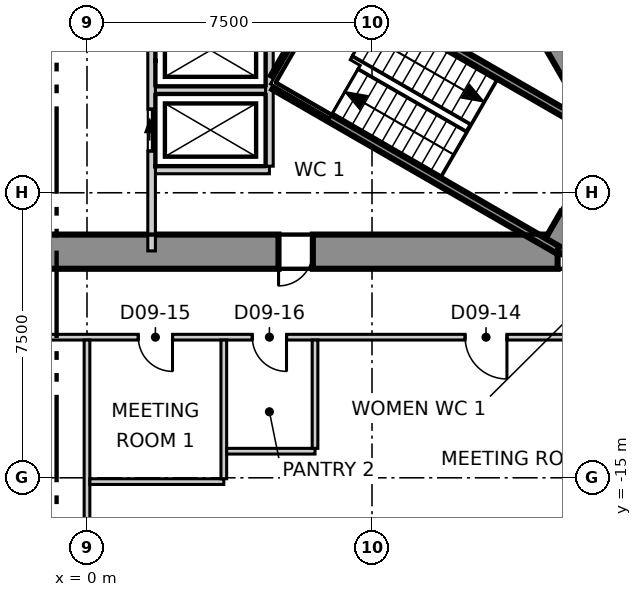
"""IFC4 building model, lengths in metres.
Left out: names, types, materials, properties, quantities, classifications, styles, units other than length and angle.
Written with IfcOpenShell. Run it as: python <this file> out.ifc"""

import sys

from ifc_helpers import new_model, si_unit, direction, frame, frame_2d, origin, place, context, subcontext, project, spatial, polyline, rectangle, outline, extrude, element, fill, save


model = new_model("IFC4")
c1 = context("Model", 3, precision=1e-05, world=origin(), true_north=direction((0.0, 1.0)))
c2 = subcontext(c1, "Body", "Model", "MODEL_VIEW")
j1 = project(units=[si_unit("LENGTHUNIT", "METRE"), si_unit("PLANEANGLEUNIT", "RADIAN")], contexts=[c1])
p1 = place(None, origin())
s1 = spatial("IfcSite", under=j1, at=p1, CompositionType="ELEMENT")
p2 = place(p1, origin())
s2 = spatial("IfcBuilding", under=s1, at=p2, CompositionType="ELEMENT")
p3 = place(p2, frame((0.0, 0.0, 47.3)))
s3 = spatial("IfcBuildingStorey", under=s2, at=p3, CompositionType="ELEMENT", Elevation=47.3)
p4 = place(p3, frame((-12.384, -9.05, -0.3), z_axis=(0.0, 0.0, 1.0), x_axis=(1.0, 0.0, 0.0)))
e1 = element("IfcWall", 1, at=p4, inside=s3, PredefinedType="SHEAR", context=c2, shape_type="SweptSolid", body=[
    extrude(outline(polyline([(-0.26, -0.45), (1.685, -0.45), (3.63, -0.45), (5.576, -0.45), (7.521, -0.45), (9.466, -0.45), (11.411, -0.45), (13.357, -0.45), (15.302, -0.45), (17.247, -0.45), (19.192, -0.45), (21.138, -0.45), (23.083, -0.45), (25.028, -0.45), (24.508, 0.45), (22.643, 0.45), (20.778, 0.45), (18.912, 0.45), (17.047, 0.45), (15.182, 0.45), (13.317, 0.45), (11.451, 0.45), (9.586, 0.45), (7.721, 0.45), (5.856, 0.45), (3.99, 0.45), (2.125, 0.45), (0.26, 0.45), (-0.26, -0.45)])), origin(), (0.0, 0.0, 1.0), 4.0),
])
p5 = place(p4, frame((5.04, 0.0, 0.3)))
e2 = element("IfcOpeningElement", 2, at=p5, cuts=e1, PredefinedType="OPENING", context=c2, shape_type="SweptSolid", body=[
    extrude(rectangle(XDim=0.9, YDim=2.1, at=frame_2d((0.45, 1.05))), frame((0.0, 0.46, 0.0), z_axis=(0.0, -1.0, 0.0), x_axis=(1.0, 0.0, 0.0)), (0.0, 0.0, 1.0), 0.92),
])
p6 = place(p4, frame((17.425, 0.0, 0.3)))
e3 = element("IfcOpeningElement", 3, at=p6, cuts=e1, PredefinedType="OPENING", context=c2, shape_type="SweptSolid", body=[
    extrude(rectangle(XDim=0.9, YDim=2.1, at=frame_2d((0.45, 1.05))), frame((0.0, 0.46, 0.0), z_axis=(0.0, -1.0, 0.0), x_axis=(1.0, 0.0, 0.0)), (0.0, 0.0, 1.0), 0.92),
])
p7 = place(p3, frame((12.384, -9.05, -0.3), z_axis=(0.0, 0.0, 1.0), x_axis=(0.500111984565, 0.865960739811, 0.0)))
e4 = element("IfcWall", 4, at=p7, inside=s3, PredefinedType="SHEAR", context=c2, shape_type="SweptSolid", body=[
    extrude(outline(polyline([(-0.26, -0.45), (1.646, -0.449), (3.551, -0.449), (3.031, 0.45), (1.646, 0.45), (0.26, 0.45), (-0.26, -0.45)])), origin(), (0.0, 0.0, 1.0), 4.0),
])
p8 = place(p7, frame((0.946, 0.0, 0.3)))
e5 = element("IfcOpeningElement", 5, at=p8, cuts=e4, PredefinedType="OPENING", context=c2, shape_type="SweptSolid", body=[
    extrude(rectangle(XDim=1.4, YDim=2.1, at=frame_2d((0.7, 1.05))), frame((0.0, 0.46, 0.0), z_axis=(0.0, -1.0, 0.0), x_axis=(1.0, 0.0, 0.0)), (0.0, 0.0, 1.0), 0.92),
])
p9 = place(p3, frame((14.03, -6.2, -0.3), z_axis=(0.0, 0.0, 1.0), x_axis=(-0.500026485275, 0.866010111964, 0.0)))
e6 = element("IfcWall", 6, at=p9, inside=s3, PredefinedType="SHEAR", context=c2, shape_type="SweptSolid", body=[
    extrude(outline(polyline([(-0.26, -0.449), (1.685, -0.449), (3.63, -0.449), (5.576, -0.449), (7.521, -0.449), (9.466, -0.449), (11.411, -0.449), (13.357, -0.449), (15.302, -0.449), (17.247, -0.45), (19.192, -0.45), (21.138, -0.45), (23.083, -0.45), (25.028, -0.45), (24.509, 0.449), (22.644, 0.449), (20.778, 0.449), (18.913, 0.449), (17.048, 0.449), (15.182, 0.449), (13.317, 0.449), (11.452, 0.449), (9.587, 0.449), (7.721, 0.45), (5.856, 0.45), (3.991, 0.45), (2.125, 0.45), (0.26, 0.45), (-0.26, -0.449)])), origin(), (0.0, 0.0, 1.0), 4.0),
])
p10 = place(p9, frame((11.484, 0.0, 0.3)))
e7 = element("IfcOpeningElement", 7, at=p10, cuts=e6, PredefinedType="OPENING", context=c2, shape_type="SweptSolid", body=[
    extrude(rectangle(XDim=1.8, YDim=2.1, at=frame_2d((0.9, 1.05))), frame((0.0, 0.46, 0.0), z_axis=(0.0, -1.0, 0.0), x_axis=(1.0, 0.0, 0.0)), (0.0, 0.0, 1.0), 0.92),
])
p11 = place(p9, frame((18.976, 0.0, 0.3)))
e8 = element("IfcOpeningElement", 8, at=p11, cuts=e6, PredefinedType="OPENING", context=c2, shape_type="SweptSolid", body=[
    extrude(rectangle(XDim=0.9, YDim=2.1, at=frame_2d((0.45, 1.05))), frame((0.0, 0.46, 0.0), z_axis=(0.0, -1.0, 0.0), x_axis=(1.0, 0.0, 0.0)), (0.0, 0.0, 1.0), 0.92),
])
p12 = place(p3, frame((34.701, -16.089, 0.0), z_axis=(0.0, 0.0, 1.0), x_axis=(-0.499998722828, 0.866026141159, 0.0)))
e9 = element("IfcWall", 9, at=p12, inside=s3, PredefinedType="ELEMENTEDWALL", context=c2, shape_type="SweptSolid", body=[
    extrude(rectangle(XDim=62.548, YDim=0.2, at=frame_2d((31.274, 0.0))), origin(), (0.0, 0.0, 1.0), 3.7),
])
p13 = place(p12, frame((2.25, 0.0, 0.9)))
e10 = element("IfcOpeningElement", 10, at=p13, cuts=e9, PredefinedType="OPENING", context=c2, shape_type="SweptSolid", body=[
    extrude(rectangle(XDim=5.6, YDim=2.5, at=frame_2d((2.8, 1.25))), frame((0.0, 0.11, 0.0), z_axis=(0.0, -1.0, 0.0), x_axis=(1.0, 0.0, 0.0)), (0.0, 0.0, 1.0), 0.22),
])
p14 = place(p12, frame((9.746, 0.0, 0.9)))
e11 = element("IfcOpeningElement", 11, at=p14, cuts=e9, PredefinedType="OPENING", context=c2, shape_type="SweptSolid", body=[
    extrude(rectangle(XDim=5.6, YDim=2.5, at=frame_2d((2.8, 1.25))), frame((0.0, 0.11, 0.0), z_axis=(0.0, -1.0, 0.0), x_axis=(1.0, 0.0, 0.0)), (0.0, 0.0, 1.0), 0.22),
])
p15 = place(p12, frame((17.241, 0.0, 0.9)))
e12 = element("IfcOpeningElement", 12, at=p15, cuts=e9, PredefinedType="OPENING", context=c2, shape_type="SweptSolid", body=[
    extrude(rectangle(XDim=5.6, YDim=2.5, at=frame_2d((2.8, 1.25))), frame((0.0, 0.11, 0.0), z_axis=(0.0, -1.0, 0.0), x_axis=(1.0, 0.0, 0.0)), (0.0, 0.0, 1.0), 0.22),
])
p16 = place(p12, frame((24.736, 0.0, 0.9)))
e13 = element("IfcOpeningElement", 13, at=p16, cuts=e9, PredefinedType="OPENING", context=c2, shape_type="SweptSolid", body=[
    extrude(rectangle(XDim=5.6, YDim=2.5, at=frame_2d((2.8, 1.25))), frame((0.0, 0.11, 0.0), z_axis=(0.0, -1.0, 0.0), x_axis=(1.0, 0.0, 0.0)), (0.0, 0.0, 1.0), 0.22),
])
p17 = place(p12, frame((32.232, 0.0, 0.9)))
e14 = element("IfcOpeningElement", 14, at=p17, cuts=e9, PredefinedType="OPENING", context=c2, shape_type="SweptSolid", body=[
    extrude(rectangle(XDim=5.6, YDim=2.5, at=frame_2d((2.8, 1.25))), frame((0.0, 0.11, 0.0), z_axis=(0.0, -1.0, 0.0), x_axis=(1.0, 0.0, 0.0)), (0.0, 0.0, 1.0), 0.22),
])
p18 = place(p12, frame((39.727, 0.0, 0.9)))
e15 = element("IfcOpeningElement", 15, at=p18, cuts=e9, PredefinedType="OPENING", context=c2, shape_type="SweptSolid", body=[
    extrude(rectangle(XDim=5.6, YDim=2.5, at=frame_2d((2.8, 1.25))), frame((0.0, 0.11, 0.0), z_axis=(0.0, -1.0, 0.0), x_axis=(1.0, 0.0, 0.0)), (0.0, 0.0, 1.0), 0.22),
])
p19 = place(p12, frame((47.222, 0.0, 0.9)))
e16 = element("IfcOpeningElement", 16, at=p19, cuts=e9, PredefinedType="OPENING", context=c2, shape_type="SweptSolid", body=[
    extrude(rectangle(XDim=5.6, YDim=2.5, at=frame_2d((2.8, 1.25))), frame((0.0, 0.11, 0.0), z_axis=(0.0, -1.0, 0.0), x_axis=(1.0, 0.0, 0.0)), (0.0, 0.0, 1.0), 0.22),
])
p20 = place(p12, frame((54.717, 0.0, 0.9)))
e17 = element("IfcOpeningElement", 17, at=p20, cuts=e9, PredefinedType="OPENING", context=c2, shape_type="SweptSolid", body=[
    extrude(rectangle(XDim=5.6, YDim=2.5, at=frame_2d((2.8, 1.25))), frame((0.0, 0.11, 0.0), z_axis=(0.0, -1.0, 0.0), x_axis=(1.0, 0.0, 0.0)), (0.0, 0.0, 1.0), 0.22),
])
p21 = place(p3, frame((-19.497, -11.17, 0.0), z_axis=(0.0, 0.0, 1.0), x_axis=(0.499998854553, 0.866026065108, 0.0)))
e18 = element("IfcWall", 18, at=p21, inside=s3, PredefinedType="PARTITIONING", context=c2, shape_type="SweptSolid", body=[
    extrude(rectangle(XDim=38.994, YDim=0.15, at=frame_2d((19.497, 0.0))), origin(), (0.0, 0.0, 1.0), 3.7),
])
p22 = place(p21, frame((36.144, 0.0, 0.0)))
e19 = element("IfcOpeningElement", 19, at=p22, cuts=e18, PredefinedType="OPENING", context=c2, shape_type="SweptSolid", body=[
    extrude(rectangle(XDim=1.1, YDim=2.1, at=frame_2d((0.55, 1.05))), frame((0.0, 0.085, 0.0), z_axis=(0.0, -1.0, 0.0), x_axis=(1.0, 0.0, 0.0)), (0.0, 0.0, 1.0), 0.17),
])
p23 = place(p21, frame((21.963, 0.0, 0.0)))
e20 = element("IfcOpeningElement", 20, at=p23, cuts=e18, PredefinedType="OPENING", context=c2, shape_type="SweptSolid", body=[
    extrude(rectangle(XDim=1.1, YDim=2.1, at=frame_2d((0.55, 1.05))), frame((0.0, 0.085, 0.0), z_axis=(0.0, -1.0, 0.0), x_axis=(1.0, 0.0, 0.0)), (0.0, 0.0, 1.0), 0.17),
])
p24 = place(p21, frame((32.363, 0.0, 0.0)))
e21 = element("IfcOpeningElement", 21, at=p24, cuts=e18, PredefinedType="OPENING", context=c2, shape_type="SweptSolid", body=[
    extrude(rectangle(XDim=0.9, YDim=2.1, at=frame_2d((0.45, 1.05))), frame((0.0, 0.085, 0.0), z_axis=(0.0, -1.0, 0.0), x_axis=(1.0, 0.0, 0.0)), (0.0, 0.0, 1.0), 0.17),
])
p25 = place(p21, frame((29.163, 0.0, 0.0)))
e22 = element("IfcOpeningElement", 22, at=p25, cuts=e18, PredefinedType="OPENING", context=c2, shape_type="SweptSolid", body=[
    extrude(rectangle(XDim=0.9, YDim=2.1, at=frame_2d((0.45, 1.05))), frame((0.0, 0.085, 0.0), z_axis=(0.0, -1.0, 0.0), x_axis=(1.0, 0.0, 0.0)), (0.0, 0.0, 1.0), 0.17),
])
p26 = place(p21, frame((26.263, 0.0, 0.0)))
e23 = element("IfcOpeningElement", 23, at=p26, cuts=e18, PredefinedType="OPENING", context=c2, shape_type="SweptSolid", body=[
    extrude(rectangle(XDim=1.0, YDim=2.1, at=frame_2d((0.5, 1.05))), frame((0.0, 0.085, 0.0), z_axis=(0.0, -1.0, 0.0), x_axis=(1.0, 0.0, 0.0)), (0.0, 0.0, 1.0), 0.17),
])
p27 = place(p21, frame((11.373, 0.0, 0.0)))
e24 = element("IfcOpeningElement", 24, at=p27, cuts=e18, PredefinedType="OPENING", context=c2, shape_type="SweptSolid", body=[
    extrude(rectangle(XDim=1.1, YDim=2.1, at=frame_2d((0.55, 1.05))), frame((0.0, 0.085, 0.0), z_axis=(0.0, -1.0, 0.0), x_axis=(1.0, 0.0, 0.0)), (0.0, 0.0, 1.0), 0.17),
])
p28 = place(p21, frame((1.581, 0.0, 0.0)))
e25 = element("IfcOpeningElement", 25, at=p28, cuts=e18, PredefinedType="OPENING", context=c2, shape_type="SweptSolid", body=[
    extrude(rectangle(XDim=1.1, YDim=2.1, at=frame_2d((0.55, 1.05))), frame((0.0, 0.085, 0.0), z_axis=(0.0, -1.0, 0.0), x_axis=(1.0, 0.0, 0.0)), (0.0, 0.0, 1.0), 0.17),
])
p29 = place(p3, frame((-19.422, -11.3, 0.0), z_axis=(0.0, 0.0, 1.0), x_axis=(1.0, 0.0, 0.0)))
e26 = element("IfcWall", 26, at=p29, inside=s3, PredefinedType="PARTITIONING", context=c2, shape_type="SweptSolid", body=[
    extrude(rectangle(XDim=38.994, YDim=0.15, at=frame_2d((19.497, 0.0))), origin(), (0.0, 0.0, 1.0), 3.7),
])
p30 = place(p29, frame((1.6, 0.0, 0.0)))
e27 = element("IfcOpeningElement", 27, at=p30, cuts=e26, PredefinedType="OPENING", context=c2, shape_type="SweptSolid", body=[
    extrude(rectangle(XDim=1.1, YDim=2.1, at=frame_2d((0.55, 1.05))), frame((0.0, 0.085, 0.0), z_axis=(0.0, -1.0, 0.0), x_axis=(1.0, 0.0, 0.0)), (0.0, 0.0, 1.0), 0.17),
])
p31 = place(p29, frame((7.682, 0.0, 0.0)))
e28 = element("IfcOpeningElement", 28, at=p31, cuts=e26, PredefinedType="OPENING", context=c2, shape_type="SweptSolid", body=[
    extrude(rectangle(XDim=1.0, YDim=2.1, at=frame_2d((0.5, 1.05))), frame((0.0, 0.085, 0.0), z_axis=(0.0, -1.0, 0.0), x_axis=(1.0, 0.0, 0.0)), (0.0, 0.0, 1.0), 0.17),
])
p32 = place(p29, frame((15.177, 0.0, 0.0)))
e29 = element("IfcOpeningElement", 29, at=p32, cuts=e26, PredefinedType="OPENING", context=c2, shape_type="SweptSolid", body=[
    extrude(rectangle(XDim=1.0, YDim=2.1, at=frame_2d((0.5, 1.05))), frame((0.0, 0.085, 0.0), z_axis=(0.0, -1.0, 0.0), x_axis=(1.0, 0.0, 0.0)), (0.0, 0.0, 1.0), 0.17),
])
p33 = place(p29, frame((29.372, 0.0, 0.0)))
e30 = element("IfcOpeningElement", 30, at=p33, cuts=e26, PredefinedType="OPENING", context=c2, shape_type="SweptSolid", body=[
    extrude(rectangle(XDim=1.1, YDim=2.1, at=frame_2d((0.55, 1.05))), frame((0.0, 0.085, 0.0), z_axis=(0.0, -1.0, 0.0), x_axis=(1.0, 0.0, 0.0)), (0.0, 0.0, 1.0), 0.17),
])
p34 = place(p29, frame((20.772, 0.0, 0.0)))
e31 = element("IfcOpeningElement", 31, at=p34, cuts=e26, PredefinedType="OPENING", context=c2, shape_type="SweptSolid", body=[
    extrude(rectangle(XDim=0.9, YDim=2.1, at=frame_2d((0.45, 1.05))), frame((0.0, 0.085, 0.0), z_axis=(0.0, -1.0, 0.0), x_axis=(1.0, 0.0, 0.0)), (0.0, 0.0, 1.0), 0.17),
])
p35 = place(p29, frame((23.772, 0.0, 0.0)))
e32 = element("IfcOpeningElement", 32, at=p35, cuts=e26, PredefinedType="OPENING", context=c2, shape_type="SweptSolid", body=[
    extrude(rectangle(XDim=0.9, YDim=2.1, at=frame_2d((0.45, 1.05))), frame((0.0, 0.085, 0.0), z_axis=(0.0, -1.0, 0.0), x_axis=(1.0, 0.0, 0.0)), (0.0, 0.0, 1.0), 0.17),
])
p36 = place(p29, frame((36.163, 0.0, 0.0)))
e33 = element("IfcOpeningElement", 33, at=p36, cuts=e26, PredefinedType="OPENING", context=c2, shape_type="SweptSolid", body=[
    extrude(rectangle(XDim=1.1, YDim=2.1, at=frame_2d((0.55, 1.05))), frame((0.0, 0.085, 0.0), z_axis=(0.0, -1.0, 0.0), x_axis=(1.0, 0.0, 0.0)), (0.0, 0.0, 1.0), 0.17),
])
p37 = place(p3, frame((0.0, -21.927, 0.0), z_axis=(0.0, 0.0, 1.0), x_axis=(0.0, 1.0, 0.0)))
e34 = element("IfcWall", 34, at=p37, inside=s3, PredefinedType="PARTITIONING", context=c2, shape_type="SweptSolid", body=[
    extrude(rectangle(XDim=10.552, YDim=0.15, at=frame_2d((5.276, 0.0))), origin(), (0.0, 0.0, 1.0), 3.2),
])
p38 = place(p3, frame((0.075, -15.1, 0.0), z_axis=(0.0, 0.0, 1.0), x_axis=(1.0, 0.0, 0.0)))
e35 = element("IfcWall", 35, at=p38, inside=s3, PredefinedType="PARTITIONING", context=c2, shape_type="SweptSolid", body=[
    extrude(rectangle(XDim=3.525, YDim=0.15, at=frame_2d((1.763, 0.0))), origin(), (0.0, 0.0, 1.0), 3.7),
])
p39 = place(p3, frame((3.6, -15.025, 0.0), z_axis=(0.0, 0.0, 1.0), x_axis=(0.0, 1.0, 0.0)))
e36 = element("IfcWall", 36, at=p39, inside=s3, PredefinedType="PARTITIONING", context=c2, shape_type="SweptSolid", body=[
    extrude(rectangle(XDim=3.65, YDim=0.15, at=frame_2d((1.825, 0.0))), origin(), (0.0, 0.0, 1.0), 3.7),
])
p40 = place(p3, frame((0.075, 22.47, 0.0), z_axis=(0.0, 0.0, 1.0), x_axis=(0.500002280369, -0.866024087209, 0.0)))
e37 = element("IfcWall", 37, at=p40, inside=s3, PredefinedType="PARTITIONING", context=c2, shape_type="SweptSolid", body=[
    extrude(rectangle(XDim=38.844, YDim=0.15, at=frame_2d((19.422, 0.0))), origin(), (0.0, 0.0, 1.0), 3.7),
])
p41 = place(p40, frame((36.244, 0.0, 0.0)))
e38 = element("IfcOpeningElement", 38, at=p41, cuts=e37, PredefinedType="OPENING", context=c2, shape_type="SweptSolid", body=[
    extrude(rectangle(XDim=1.0, YDim=2.1, at=frame_2d((0.5, 1.05))), frame((0.0, 0.085, 0.0), z_axis=(0.0, -1.0, 0.0), x_axis=(1.0, 0.0, 0.0)), (0.0, 0.0, 1.0), 0.17),
])
p42 = place(p40, frame((21.963, 0.0, 0.0)))
e39 = element("IfcOpeningElement", 39, at=p42, cuts=e37, PredefinedType="OPENING", context=c2, shape_type="SweptSolid", body=[
    extrude(rectangle(XDim=1.1, YDim=2.1, at=frame_2d((0.55, 1.05))), frame((0.0, 0.085, 0.0), z_axis=(0.0, -1.0, 0.0), x_axis=(1.0, 0.0, 0.0)), (0.0, 0.0, 1.0), 0.17),
])
p43 = place(p40, frame((32.363, 0.0, 0.0)))
e40 = element("IfcOpeningElement", 40, at=p43, cuts=e37, PredefinedType="OPENING", context=c2, shape_type="SweptSolid", body=[
    extrude(rectangle(XDim=0.9, YDim=2.1, at=frame_2d((0.45, 1.05))), frame((0.0, 0.085, 0.0), z_axis=(0.0, -1.0, 0.0), x_axis=(1.0, 0.0, 0.0)), (0.0, 0.0, 1.0), 0.17),
])
p44 = place(p40, frame((29.163, 0.0, 0.0)))
e41 = element("IfcOpeningElement", 41, at=p44, cuts=e37, PredefinedType="OPENING", context=c2, shape_type="SweptSolid", body=[
    extrude(rectangle(XDim=0.9, YDim=2.1, at=frame_2d((0.45, 1.05))), frame((0.0, 0.085, 0.0), z_axis=(0.0, -1.0, 0.0), x_axis=(1.0, 0.0, 0.0)), (0.0, 0.0, 1.0), 0.17),
])
p45 = place(p40, frame((26.263, 0.0, 0.0)))
e42 = element("IfcOpeningElement", 42, at=p45, cuts=e37, PredefinedType="OPENING", context=c2, shape_type="SweptSolid", body=[
    extrude(rectangle(XDim=1.0, YDim=2.1, at=frame_2d((0.5, 1.05))), frame((0.0, 0.085, 0.0), z_axis=(0.0, -1.0, 0.0), x_axis=(1.0, 0.0, 0.0)), (0.0, 0.0, 1.0), 0.17),
])
p46 = place(p40, frame((9.071, 0.0, 0.0)))
e43 = element("IfcOpeningElement", 43, at=p46, cuts=e37, PredefinedType="OPENING", context=c2, shape_type="SweptSolid", body=[
    extrude(rectangle(XDim=1.1, YDim=2.1, at=frame_2d((0.55, 1.05))), frame((0.0, 0.085, 0.0), z_axis=(0.0, -1.0, 0.0), x_axis=(1.0, 0.0, 0.0)), (0.0, 0.0, 1.0), 0.17),
])
p47 = place(p3, frame((3.675, -14.3, 0.0), z_axis=(0.0, 0.0, 1.0), x_axis=(1.0, 0.0, 0.0)))
e44 = element("IfcWall", 44, at=p47, inside=s3, PredefinedType="PARTITIONING", context=c2, shape_type="SweptSolid", body=[
    extrude(rectangle(XDim=2.325, YDim=0.15, at=frame_2d((1.163, 0.0))), origin(), (0.0, 0.0, 1.0), 3.7),
])
p48 = place(p3, frame((6.0, -14.225, 0.0), z_axis=(0.0, 0.0, 1.0), x_axis=(0.0, 1.0, 0.0)))
e45 = element("IfcWall", 45, at=p48, inside=s3, PredefinedType="PARTITIONING", context=c2, shape_type="SweptSolid", body=[
    extrude(rectangle(XDim=2.85, YDim=0.15, at=frame_2d((1.425, 0.0))), origin(), (0.0, 0.0, 1.0), 3.7),
])
p49 = place(p3, frame((1.8, -4.8, 0.0), z_axis=(0.0, 0.0, 1.0), x_axis=(1.0, 0.0, 0.0)))
e46 = element("IfcWall", 46, at=p49, inside=s3, PredefinedType="SOLIDWALL", context=c2, shape_type="SweptSolid", body=[
    extrude(rectangle(XDim=2.9, YDim=0.2, at=frame_2d((1.45, 0.0))), origin(), (0.0, 0.0, 1.0), 3.7),
])
p50 = place(p3, frame((1.8, -6.9, 0.0), z_axis=(0.0, 0.0, 1.0), x_axis=(1.0, 0.0, 0.0)))
e47 = element("IfcWall", 47, at=p50, inside=s3, PredefinedType="SOLIDWALL", context=c2, shape_type="SweptSolid", body=[
    extrude(rectangle(XDim=3.0, YDim=0.2, at=frame_2d((1.5, 0.0))), origin(), (0.0, 0.0, 1.0), 3.7),
])
p51 = place(p3, frame((1.7, -9.03, 0.0), z_axis=(0.0, 0.0, 1.0), x_axis=(0.0, 1.0, 0.0)))
e48 = element("IfcWall", 48, at=p51, inside=s3, PredefinedType="SOLIDWALL", context=c2, shape_type="SweptSolid", body=[
    extrude(rectangle(XDim=6.227, YDim=0.2, at=frame_2d((3.114, 0.0))), origin(), (0.0, 0.0, 1.0), 3.7),
])
p52 = place(p51, frame((2.63, 0.0, 0.0)))
e49 = element("IfcOpeningElement", 49, at=p52, cuts=e48, PredefinedType="OPENING", context=c2, shape_type="SweptSolid", body=[
    extrude(rectangle(XDim=1.1, YDim=2.1, at=frame_2d((0.55, 1.05))), frame((0.0, 0.11, 0.0), z_axis=(0.0, -1.0, 0.0), x_axis=(1.0, 0.0, 0.0)), (0.0, 0.0, 1.0), 0.22),
])
p53 = place(p3, frame((4.8, -6.8, 0.0), z_axis=(0.0, 0.0, 1.0), x_axis=(0.0, 1.0, 0.0)))
e50 = element("IfcWall", 50, at=p53, inside=s3, PredefinedType="SOLIDWALL", context=c2, shape_type="SweptSolid", body=[
    extrude(rectangle(XDim=4.029, YDim=0.2, at=frame_2d((2.015, 0.0))), origin(), (0.0, 0.0, 1.0), 3.7),
])
p54 = place(p3, frame((4.929, -4.693, 0.0), z_axis=(0.0, 0.0, 1.0), x_axis=(0.866010975815, -0.500024989144, 0.0)))
e51 = element("IfcWall", 51, at=p54, inside=s3, PredefinedType="SOLIDWALL", context=c2, shape_type="SweptSolid", body=[
    extrude(rectangle(XDim=8.615, YDim=0.2, at=frame_2d((4.308, 0.0))), origin(), (0.0, 0.0, 1.0), 3.7),
])
p55 = place(p3, frame((4.929, -4.462, 0.0), z_axis=(0.0, 0.0, 1.0), x_axis=(0.500200581029, 0.865909567298, 0.0)))
e52 = element("IfcWall", 52, at=p55, inside=s3, PredefinedType="SOLIDWALL", context=c2, shape_type="SweptSolid", body=[
    extrude(rectangle(XDim=2.799, YDim=0.2, at=frame_2d((1.399, 0.0))), origin(), (0.0, 0.0, 1.0), 3.7),
])
p56 = place(p3, frame((6.529, -1.922, 0.0), z_axis=(0.0, 0.0, 1.0), x_axis=(0.866060059011, -0.499939970583, 0.0)))
e53 = element("IfcWall", 53, at=p56, inside=s3, PredefinedType="SOLIDWALL", context=c2, shape_type="SweptSolid", body=[
    extrude(rectangle(XDim=8.615, YDim=0.2, at=frame_2d((4.307, 0.0))), origin(), (0.0, 0.0, 1.0), 3.7),
])
p57 = place(p52, origin())
e54 = element("IfcDoor", 54, at=p57, inside=s3, OperationType="SLIDING_TO_LEFT", PredefinedType="DOOR", context=c2, shape_type="SweptSolid", body=[
    extrude(rectangle(XDim=1.1, YDim=2.1, at=frame_2d((0.55, 1.05))), frame((0.0, 0.025, 0.0), z_axis=(0.0, -1.0, 0.0), x_axis=(1.0, 0.0, 0.0)), (0.0, 0.0, 1.0), 0.05),
])
fill(e49, e54)
p58 = place(p33, origin())
e55 = element("IfcDoor", 55, at=p58, inside=s3, OperationType="SINGLE_SWING_RIGHT", PredefinedType="DOOR", context=c2, shape_type="SweptSolid", body=[
    extrude(rectangle(XDim=1.1, YDim=2.1, at=frame_2d((0.55, 1.05))), frame((0.0, 0.025, 0.0), z_axis=(0.0, -1.0, 0.0), x_axis=(1.0, 0.0, 0.0)), (0.0, 0.0, 1.0), 0.05),
])
fill(e30, e55)
p59 = place(p34, origin())
e56 = element("IfcDoor", 56, at=p59, inside=s3, OperationType="SINGLE_SWING_RIGHT", PredefinedType="DOOR", context=c2, shape_type="SweptSolid", body=[
    extrude(rectangle(XDim=0.9, YDim=2.1, at=frame_2d((0.45, 1.05))), frame((0.0, 0.025, 0.0), z_axis=(0.0, -1.0, 0.0), x_axis=(1.0, 0.0, 0.0)), (0.0, 0.0, 1.0), 0.05),
])
fill(e31, e56)
p60 = place(p35, origin())
e57 = element("IfcDoor", 57, at=p60, inside=s3, OperationType="SINGLE_SWING_RIGHT", PredefinedType="DOOR", context=c2, shape_type="SweptSolid", body=[
    extrude(rectangle(XDim=0.9, YDim=2.1, at=frame_2d((0.45, 1.05))), frame((0.0, 0.025, 0.0), z_axis=(0.0, -1.0, 0.0), x_axis=(1.0, 0.0, 0.0)), (0.0, 0.0, 1.0), 0.05),
])
fill(e32, e57)
p61 = place(p6, origin())
e58 = element("IfcDoor", 58, at=p61, inside=s3, OperationType="SINGLE_SWING_LEFT", PredefinedType="DOOR", context=c2, shape_type="SweptSolid", body=[
    extrude(rectangle(XDim=0.9, YDim=2.1, at=frame_2d((0.45, 1.05))), frame((0.0, 0.175, 0.0), z_axis=(0.0, -1.0, 0.0), x_axis=(1.0, 0.0, 0.0)), (0.0, 0.0, 1.0), 0.05),
])
fill(e3, e58)
save(model, sys.argv[1])
